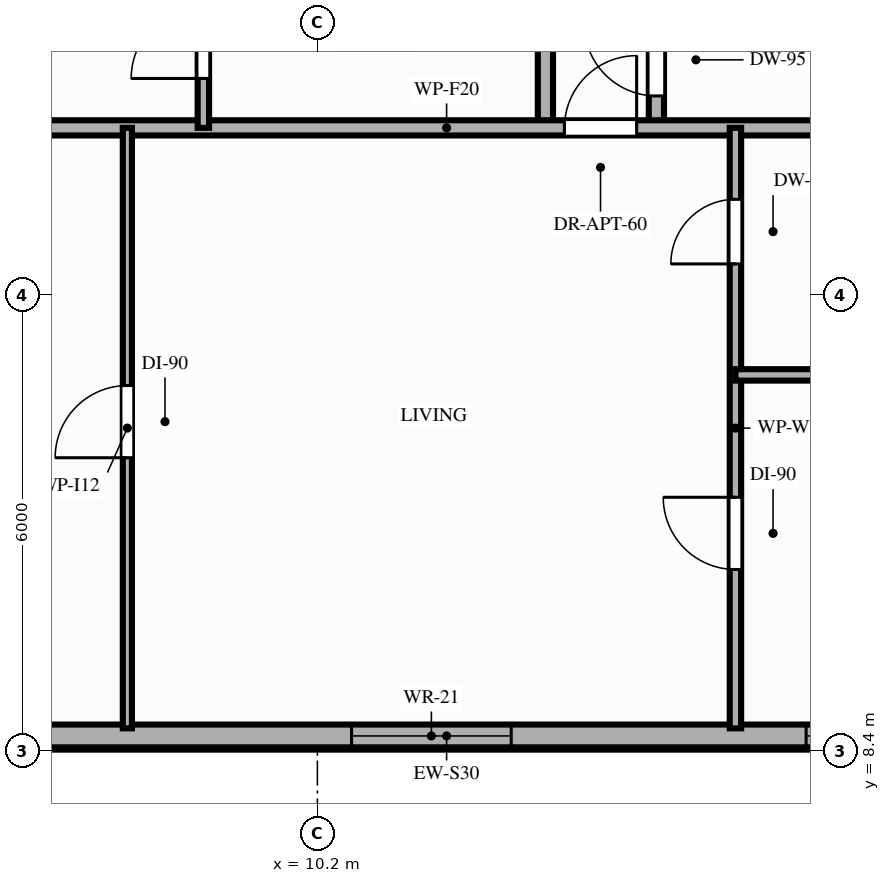
"""IFC4 building model, lengths in metres.
Left out: names, types, materials, properties, quantities, classifications, styles, units other than length and angle.
Written with IfcOpenShell. Run it as: python <this file> out.ifc"""

import sys

from ifc_helpers import new_model, si_unit, direction, frame, frame_2d, origin, place, context, subcontext, project, spatial, rectangle, extrude, element, fill, save


model = new_model("IFC4")
c1 = context("Model", 3, precision=1e-05, world=origin(), true_north=direction((0.0, 1.0)))
c2 = subcontext(c1, "Body", "Model", "MODEL_VIEW")
j1 = project(units=[si_unit("LENGTHUNIT", "METRE"), si_unit("PLANEANGLEUNIT", "RADIAN")], contexts=[c1])
p1 = place(None, origin())
s1 = spatial("IfcSite", under=j1, at=p1, CompositionType="ELEMENT")
p2 = place(p1, origin())
s2 = spatial("IfcBuilding", under=s1, at=p2, CompositionType="ELEMENT")
p3 = place(p2, frame((0.0, 0.0, 176.0)))
s3 = spatial("IfcBuildingStorey", under=s2, at=p3, CompositionType="ELEMENT", Elevation=176.0)
p4 = place(p3, frame((4.0, 8.6, 0.0), z_axis=(0.0, 0.0, 1.0), x_axis=(1.0, 0.0, 0.0)))
e1 = element("IfcWall", 1, at=p4, inside=s3, PredefinedType="STANDARD", context=c2, shape_type="SweptSolid", body=[
    extrude(rectangle(XDim=15.8, YDim=0.3, at=frame_2d((7.9, 0.0))), origin(), (0.0, 0.0, 1.0), 3.02),
])
p5 = place(p4, frame((6.65, 0.0, 0.85)))
e2 = element("IfcOpeningElement", 2, at=p5, cuts=e1, PredefinedType="OPENING", context=c2, shape_type="SweptSolid", body=[
    extrude(rectangle(XDim=2.1, YDim=1.8, at=frame_2d((1.05, 0.9))), frame((0.0, 0.16, 0.0), z_axis=(0.0, -1.0, 0.0), x_axis=(1.0, 0.0, 0.0)), (0.0, 0.0, 1.0), 0.32),
])
p6 = place(p4, frame((12.63, 0.0, 0.85)))
e3 = element("IfcOpeningElement", 3, at=p6, cuts=e1, PredefinedType="OPENING", context=c2, shape_type="SweptSolid", body=[
    extrude(rectangle(XDim=2.1, YDim=1.8, at=frame_2d((1.05, 0.9))), frame((0.0, 0.16, 0.0), z_axis=(0.0, -1.0, 0.0), x_axis=(1.0, 0.0, 0.0)), (0.0, 0.0, 1.0), 0.32),
])
p7 = place(p3, frame((13.2, 16.6, 0.0), z_axis=(0.0, 0.0, 1.0), x_axis=(0.0, 1.0, 0.0)))
e4 = element("IfcWall", 4, at=p7, inside=s3, PredefinedType="PARTITIONING", context=c2, shape_type="SweptSolid", body=[
    extrude(rectangle(XDim=11.5, YDim=0.2, at=frame_2d((5.75, 0.0))), origin(), (0.0, 0.0, 1.0), 2.46),
])
p8 = place(p7, frame((3.17, 0.0, 0.0)))
e5 = element("IfcOpeningElement", 5, at=p8, cuts=e4, PredefinedType="OPENING", context=c2, shape_type="SweptSolid", body=[
    extrude(rectangle(XDim=0.95, YDim=2.15, at=frame_2d((0.475, 1.075))), frame((0.0, 0.11, 0.0), z_axis=(0.0, -1.0, 0.0), x_axis=(1.0, 0.0, 0.0)), (0.0, 0.0, 1.0), 0.22),
])
p9 = place(p3, frame((14.66, 16.6, 0.0), z_axis=(0.0, 0.0, 1.0), x_axis=(0.0, 1.0, 0.0)))
e6 = element("IfcWall", 6, at=p9, inside=s3, PredefinedType="PARTITIONING", context=c2, shape_type="SweptSolid", body=[
    extrude(rectangle(XDim=11.5, YDim=0.2, at=frame_2d((5.75, 0.0))), origin(), (0.0, 0.0, 1.0), 2.46),
])
p10 = place(p9, frame((0.42, 0.0, 0.0)))
e7 = element("IfcOpeningElement", 7, at=p10, cuts=e6, PredefinedType="OPENING", context=c2, shape_type="SweptSolid", body=[
    extrude(rectangle(XDim=0.95, YDim=2.1, at=frame_2d((0.475, 1.05))), frame((0.0, 0.11, 0.0), z_axis=(0.0, -1.0, 0.0), x_axis=(1.0, 0.0, 0.0)), (0.0, 0.0, 1.0), 0.22),
])
p11 = place(p9, frame((3.54, 0.0, 0.0)))
e8 = element("IfcOpeningElement", 8, at=p11, cuts=e6, PredefinedType="OPENING", context=c2, shape_type="SweptSolid", body=[
    extrude(rectangle(XDim=0.95, YDim=2.15, at=frame_2d((0.475, 1.075))), frame((0.0, 0.11, 0.0), z_axis=(0.0, -1.0, 0.0), x_axis=(1.0, 0.0, 0.0)), (0.0, 0.0, 1.0), 0.22),
])
p12 = place(p9, frame((6.65, 0.0, 0.0)))
e9 = element("IfcOpeningElement", 9, at=p12, cuts=e6, PredefinedType="OPENING", context=c2, shape_type="SweptSolid", body=[
    extrude(rectangle(XDim=0.95, YDim=2.15, at=frame_2d((0.475, 1.075))), frame((0.0, 0.11, 0.0), z_axis=(0.0, -1.0, 0.0), x_axis=(1.0, 0.0, 0.0)), (0.0, 0.0, 1.0), 0.22),
])
p13 = place(p9, frame((9.48, 0.0, 0.0)))
e10 = element("IfcOpeningElement", 10, at=p13, cuts=e6, PredefinedType="OPENING", context=c2, shape_type="SweptSolid", body=[
    extrude(rectangle(XDim=0.95, YDim=2.15, at=frame_2d((0.475, 1.075))), frame((0.0, 0.11, 0.0), z_axis=(0.0, -1.0, 0.0), x_axis=(1.0, 0.0, 0.0)), (0.0, 0.0, 1.0), 0.22),
])
p14 = place(p3, frame((3.9, 16.6, 0.0), z_axis=(0.0, 0.0, 1.0), x_axis=(1.0, 0.0, 0.0)))
e11 = element("IfcWall", 11, at=p14, inside=s3, PredefinedType="PARTITIONING", context=c2, shape_type="SweptSolid", body=[
    extrude(rectangle(XDim=16.0, YDim=0.2, at=frame_2d((8.0, 0.0))), origin(), (0.0, 0.0, 1.0), 2.46),
])
p15 = place(p14, frame((9.55, 0.0, 0.0)))
e12 = element("IfcOpeningElement", 12, at=p15, cuts=e11, PredefinedType="OPENING", context=c2, shape_type="SweptSolid", body=[
    extrude(rectangle(XDim=0.95, YDim=2.15, at=frame_2d((0.475, 1.075))), frame((0.0, 0.11, 0.0), z_axis=(0.0, -1.0, 0.0), x_axis=(1.0, 0.0, 0.0)), (0.0, 0.0, 1.0), 0.22),
])
p16 = place(p3, frame((7.7, 8.7, 0.0), z_axis=(0.0, 0.0, 1.0), x_axis=(0.0, 1.0, 0.0)))
e13 = element("IfcWall", 13, at=p16, inside=s3, PredefinedType="PARTITIONING", context=c2, shape_type="SweptSolid", body=[
    extrude(rectangle(XDim=7.9, YDim=0.12, at=frame_2d((3.95, 0.0))), origin(), (0.0, 0.0, 1.0), 2.46),
])
p17 = place(p16, frame((3.56, 0.0, 0.0)))
e14 = element("IfcOpeningElement", 14, at=p17, cuts=e13, PredefinedType="OPENING", context=c2, shape_type="SweptSolid", body=[
    extrude(rectangle(XDim=0.95, YDim=2.15, at=frame_2d((0.475, 1.075))), frame((0.0, 0.07, 0.0), z_axis=(0.0, -1.0, 0.0), x_axis=(1.0, 0.0, 0.0)), (0.0, 0.0, 1.0), 0.14),
])
p18 = place(p3, frame((15.7, 8.7, 0.0), z_axis=(0.0, 0.0, 1.0), x_axis=(0.0, 1.0, 0.0)))
e15 = element("IfcWall", 15, at=p18, inside=s3, PredefinedType="PARTITIONING", context=c2, shape_type="SweptSolid", body=[
    extrude(rectangle(XDim=7.9, YDim=0.15, at=frame_2d((3.95, 0.0))), origin(), (0.0, 0.0, 1.0), 2.46),
])
p19 = place(p18, frame((2.09, 0.0, 0.0)))
e16 = element("IfcOpeningElement", 16, at=p19, cuts=e15, PredefinedType="OPENING", context=c2, shape_type="SweptSolid", body=[
    extrude(rectangle(XDim=0.95, YDim=2.15, at=frame_2d((0.475, 1.075))), frame((0.0, 0.085, 0.0), z_axis=(0.0, -1.0, 0.0), x_axis=(1.0, 0.0, 0.0)), (0.0, 0.0, 1.0), 0.17),
])
p20 = place(p18, frame((6.11, 0.0, 0.0)))
e17 = element("IfcOpeningElement", 17, at=p20, cuts=e15, PredefinedType="OPENING", context=c2, shape_type="SweptSolid", body=[
    extrude(rectangle(XDim=0.85, YDim=2.1, at=frame_2d((0.425, 1.05))), frame((0.0, 0.085, 0.0), z_axis=(0.0, -1.0, 0.0), x_axis=(1.0, 0.0, 0.0)), (0.0, 0.0, 1.0), 0.17),
])
p21 = place(p3, frame((15.7, 13.35, 0.0), z_axis=(0.0, 0.0, 1.0), x_axis=(1.0, 0.0, 0.0)))
e18 = element("IfcWall", 18, at=p21, inside=s3, PredefinedType="PARTITIONING", context=c2, shape_type="SweptSolid", body=[
    extrude(rectangle(XDim=4.2, YDim=0.15, at=frame_2d((2.1, 0.0))), origin(), (0.0, 0.0, 1.0), 2.46),
])
p22 = place(p3, frame((8.7, 16.6, 0.0), z_axis=(0.0, 0.0, 1.0), x_axis=(0.0, 1.0, 0.0)))
e19 = element("IfcWall", 19, at=p22, inside=s3, PredefinedType="PARTITIONING", context=c2, shape_type="SweptSolid", body=[
    extrude(rectangle(XDim=2.3, YDim=0.15, at=frame_2d((1.15, 0.0))), origin(), (0.0, 0.0, 1.0), 2.46),
])
p23 = place(p22, frame((0.65, 0.0, 0.0)))
e20 = element("IfcOpeningElement", 20, at=p23, cuts=e19, PredefinedType="OPENING", context=c2, shape_type="SweptSolid", body=[
    extrude(rectangle(XDim=0.95, YDim=2.15, at=frame_2d((0.475, 1.075))), frame((0.0, 0.085, 0.0), z_axis=(0.0, -1.0, 0.0), x_axis=(1.0, 0.0, 0.0)), (0.0, 0.0, 1.0), 0.17),
])
p24 = place(p5, origin())
e21 = element("IfcWindow", 21, at=p24, inside=s3, PartitioningType="SINGLE_PANEL", PredefinedType="WINDOW", context=c2, shape_type="SweptSolid", body=[
    extrude(rectangle(XDim=2.1, YDim=1.8, at=frame_2d((1.05, 0.9))), frame((0.0, 0.03, 0.0), z_axis=(0.0, -1.0, 0.0), x_axis=(1.0, 0.0, 0.0)), (0.0, 0.0, 1.0), 0.06),
])
fill(e2, e21)
p25 = place(p6, origin())
e22 = element("IfcWindow", 22, at=p25, inside=s3, PartitioningType="SINGLE_PANEL", PredefinedType="WINDOW", context=c2, shape_type="SweptSolid", body=[
    extrude(rectangle(XDim=2.1, YDim=1.8, at=frame_2d((1.05, 0.9))), frame((0.0, 0.03, 0.0), z_axis=(0.0, -1.0, 0.0), x_axis=(1.0, 0.0, 0.0)), (0.0, 0.0, 1.0), 0.06),
])
fill(e3, e22)
p26 = place(p15, origin())
e23 = element("IfcDoor", 23, at=p26, inside=s3, OperationType="SINGLE_SWING_RIGHT", PredefinedType="DOOR", context=c2, shape_type="SweptSolid", body=[
    extrude(rectangle(XDim=0.95, YDim=2.15, at=frame_2d((0.475, 1.075))), frame((0.0, 0.025, 0.0), z_axis=(0.0, -1.0, 0.0), x_axis=(1.0, 0.0, 0.0)), (0.0, 0.0, 1.0), 0.05),
])
fill(e12, e23)
p27 = place(p17, origin())
e24 = element("IfcDoor", 24, at=p27, inside=s3, OperationType="SINGLE_SWING_LEFT", PredefinedType="DOOR", context=c2, shape_type="SweptSolid", body=[
    extrude(rectangle(XDim=0.95, YDim=2.15, at=frame_2d((0.475, 1.075))), frame((0.0, 0.025, 0.0), z_axis=(0.0, -1.0, 0.0), x_axis=(1.0, 0.0, 0.0)), (0.0, 0.0, 1.0), 0.05),
])
fill(e14, e24)
p28 = place(p19, origin())
e25 = element("IfcDoor", 25, at=p28, inside=s3, OperationType="SINGLE_SWING_RIGHT", PredefinedType="DOOR", context=c2, shape_type="SweptSolid", body=[
    extrude(rectangle(XDim=0.95, YDim=2.15, at=frame_2d((0.475, 1.075))), frame((0.0, 0.025, 0.0), z_axis=(0.0, -1.0, 0.0), x_axis=(1.0, 0.0, 0.0)), (0.0, 0.0, 1.0), 0.05),
])
fill(e16, e25)
p29 = place(p20, origin())
e26 = element("IfcDoor", 26, at=p29, inside=s3, OperationType="SINGLE_SWING_LEFT", PredefinedType="DOOR", context=c2, shape_type="SweptSolid", body=[
    extrude(rectangle(XDim=0.85, YDim=2.1, at=frame_2d((0.425, 1.05))), frame((0.0, 0.025, 0.0), z_axis=(0.0, -1.0, 0.0), x_axis=(1.0, 0.0, 0.0)), (0.0, 0.0, 1.0), 0.05),
])
fill(e17, e26)
p30 = place(p23, origin())
e27 = element("IfcDoor", 27, at=p30, inside=s3, OperationType="SINGLE_SWING_LEFT", PredefinedType="DOOR", context=c2, shape_type="SweptSolid", body=[
    extrude(rectangle(XDim=0.95, YDim=2.15, at=frame_2d((0.475, 1.075))), frame((0.0, 0.025, 0.0), z_axis=(0.0, -1.0, 0.0), x_axis=(1.0, 0.0, 0.0)), (0.0, 0.0, 1.0), 0.05),
])
fill(e20, e27)
p31 = place(p10, origin())
e28 = element("IfcDoor", 28, at=p31, inside=s3, OperationType="SINGLE_SWING_RIGHT", PredefinedType="DOOR", context=c2, shape_type="SweptSolid", body=[
    extrude(rectangle(XDim=0.95, YDim=2.1, at=frame_2d((0.475, 1.05))), frame((0.0, 0.025, 0.0), z_axis=(0.0, -1.0, 0.0), x_axis=(1.0, 0.0, 0.0)), (0.0, 0.0, 1.0), 0.05),
])
fill(e7, e28)
save(model, sys.argv[1])
